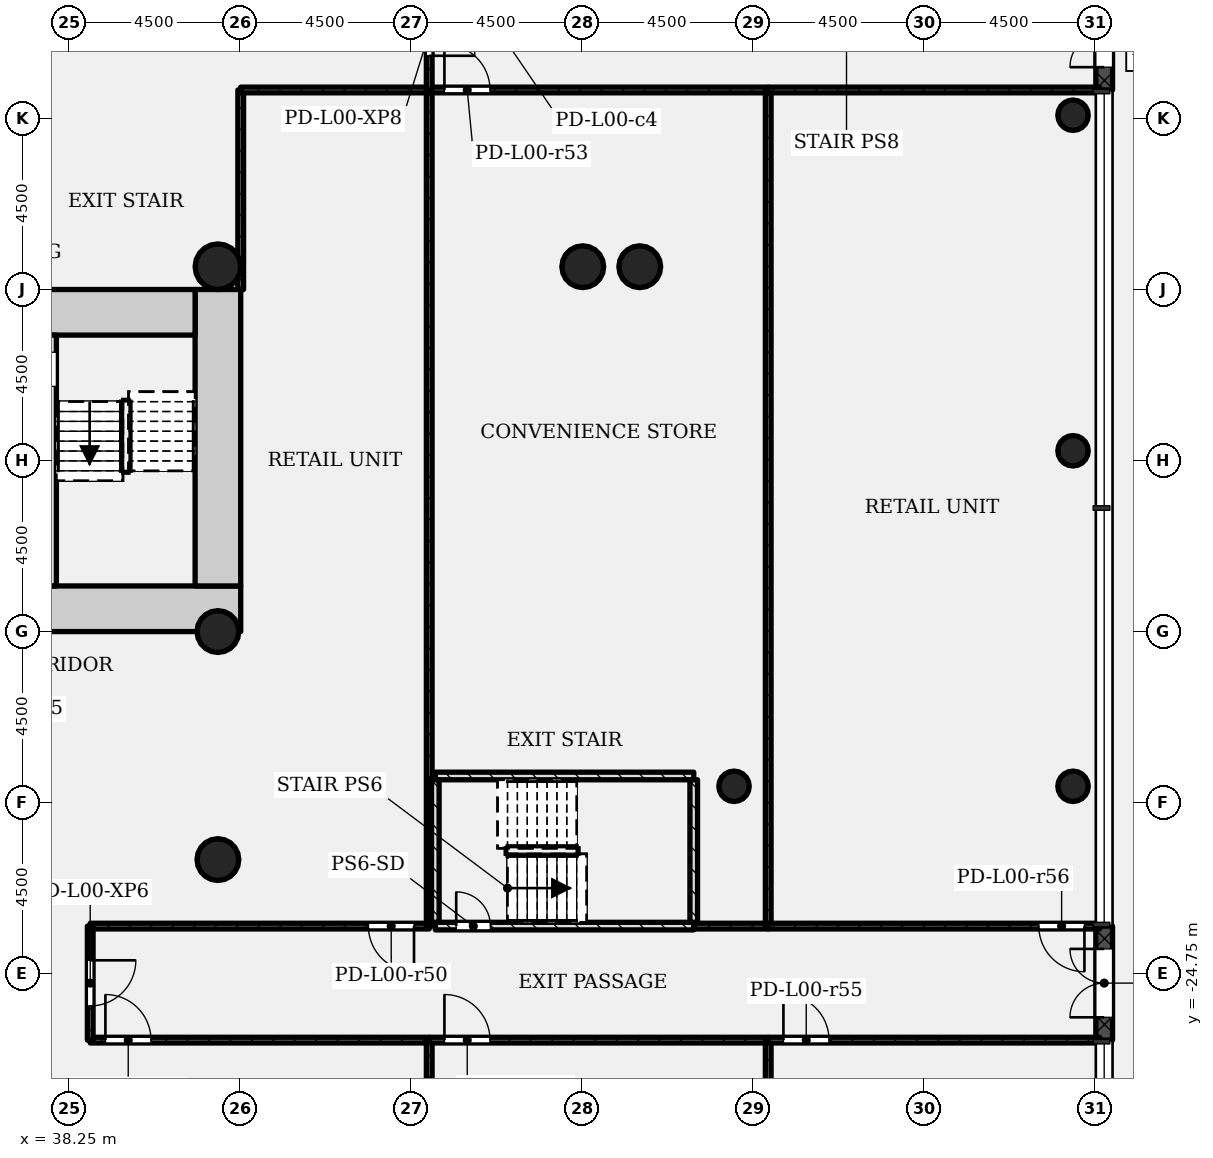
"""IFC4 building model, lengths in metres.
Left out: names, types, materials, properties, quantities, classifications, styles, units other than length and angle.
Written with IfcOpenShell. Run it as: python <this file> out.ifc"""

import sys

from ifc_helpers import new_model, si_unit, direction, frame, frame_2d, origin, origin_2d, place, context, subcontext, project, spatial, rectangle, hollow_circle, extrude, element, fill, save


model = new_model("IFC4")
c1 = context("Model", 3, precision=1e-05, world=origin(), true_north=direction((0.0, 1.0)))
c2 = subcontext(c1, "Body", "Model", "MODEL_VIEW")
j1 = project(units=[si_unit("LENGTHUNIT", "METRE"), si_unit("PLANEANGLEUNIT", "RADIAN")], contexts=[c1])
p1 = place(None, origin())
s1 = spatial("IfcSite", under=j1, at=p1, CompositionType="ELEMENT")
p2 = place(p1, origin())
s2 = spatial("IfcBuilding", under=s1, at=p2, CompositionType="ELEMENT")
p3 = place(p2, origin())
s3 = spatial("IfcBuildingStorey", under=s2, at=p3, CompositionType="ELEMENT", Elevation=0.0)
p4 = place(p3, frame((30.45, -15.15, -0.4), z_axis=(0.0, 0.0, 1.0), x_axis=(1.0, 0.0, 0.0)))
e1 = element("IfcWall", 1, at=p4, inside=s3, PredefinedType="SHEAR", context=c2, shape_type="SweptSolid", body=[
    extrude(rectangle(XDim=12.3, YDim=1.2, at=frame_2d((6.15, 0.0))), origin(), (0.0, 0.0, 1.0), 6.4),
])
p5 = place(p4, frame((4.65, 0.0, 0.4)))
e2 = element("IfcOpeningElement", 2, at=p5, cuts=e1, PredefinedType="OPENING", context=c2, shape_type="SweptSolid", body=[
    extrude(rectangle(XDim=1.8, YDim=2.1, at=frame_2d((0.9, 1.05))), frame((0.0, 0.61, 0.0), z_axis=(0.0, -1.0, 0.0), x_axis=(1.0, 0.0, 0.0)), (0.0, 0.0, 1.0), 1.22),
])
p6 = place(p3, frame((42.15, -14.55, -0.4), z_axis=(0.0, 0.0, 1.0), x_axis=(0.0, 1.0, 0.0)))
e3 = element("IfcWall", 3, at=p6, inside=s3, PredefinedType="SHEAR", context=c2, shape_type="SweptSolid", body=[
    extrude(rectangle(XDim=7.8, YDim=1.2, at=frame_2d((3.9, 0.0))), origin(), (0.0, 0.0, 1.0), 6.4),
])
p7 = place(p3, frame((41.55, -7.35, -0.4), z_axis=(0.0, 0.0, 1.0), x_axis=(-1.0, 0.0, 0.0)))
e4 = element("IfcWall", 4, at=p7, inside=s3, PredefinedType="SHEAR", context=c2, shape_type="SweptSolid", body=[
    extrude(rectangle(XDim=12.3, YDim=1.2, at=frame_2d((6.15, 0.0))), origin(), (0.0, 0.0, 1.0), 6.4),
])
p8 = place(p7, frame((4.65, 0.0, 0.4)))
e5 = element("IfcOpeningElement", 5, at=p8, cuts=e4, PredefinedType="OPENING", context=c2, shape_type="SweptSolid", body=[
    extrude(rectangle(XDim=1.8, YDim=2.1, at=frame_2d((0.9, 1.05))), frame((0.0, 0.61, 0.0), z_axis=(0.0, -1.0, 0.0), x_axis=(1.0, 0.0, 0.0)), (0.0, 0.0, 1.0), 1.22),
])
p9 = place(p3, frame((37.7, -14.55, -0.4), z_axis=(0.0, 0.0, 1.0), x_axis=(0.0, 1.0, 0.0)))
e6 = element("IfcWall", 6, at=p9, inside=s3, PredefinedType="SHEAR", context=c2, shape_type="SweptSolid", body=[
    extrude(rectangle(XDim=6.6, YDim=0.4, at=frame_2d((3.3, 0.0))), origin(), (0.0, 0.0, 1.0), 6.4),
])
p10 = place(p9, frame((5.25, 0.0, 0.4)))
e7 = element("IfcOpeningElement", 7, at=p10, cuts=e6, PredefinedType="OPENING", context=c2, shape_type="SweptSolid", body=[
    extrude(rectangle(XDim=0.9, YDim=2.1, at=frame_2d((0.45, 1.05))), frame((0.0, 0.21, 0.0), z_axis=(0.0, -1.0, 0.0), x_axis=(1.0, 0.0, 0.0)), (0.0, 0.0, 1.0), 0.42),
])
for number, where, z_axis, x_axis in (
    (8, (42.15, -15.75, -0.4), (0.0, 0.0, 1.0), (1.0, 0.0, 0.0)),
    (9, (42.15, -21.75, -0.4), (0.0, 0.0, 1.0), (1.0, 0.0, 0.0)),
    (10, (51.75, -6.15, -0.4), (0.0, 0.0, 1.0), (1.0, 0.0, 0.0)),
    (11, (53.25, -6.15, -0.4), (0.0, 0.0, 1.0), (1.0, 0.0, 0.0)),
):
    element("IfcColumn", number, at=place(p3, frame(where, z_axis=z_axis, x_axis=x_axis)), inside=s3, PredefinedType="COLUMN", context=c2, shape_type="SweptSolid", body=[
        extrude(hollow_circle(Radius=0.55, WallThickness=0.04, at=origin_2d()), origin(), (0.0, 0.0, 1.0), 6.4),
    ])
p11 = place(p3, frame((42.15, -6.15, -0.4), z_axis=(0.0, 0.0, 1.0), x_axis=(1.0, 0.0, 0.0)))
e12 = element("IfcColumn", 12, at=p11, inside=s3, PredefinedType="COLUMN", context=c2, shape_type="SweptSolid", body=[
    extrude(hollow_circle(Radius=0.6, WallThickness=0.045, at=origin_2d()), origin(), (0.0, 0.0, 1.0), 6.4),
])
for number, where, z_axis, x_axis in (
    (13, (55.73, -19.821, -0.4), (0.0, 0.0, 1.0), (1.0, 0.0, 0.0)),
    (14, (64.65, -19.821, -0.4), (0.0, 0.0, 1.0), (1.0, 0.0, 0.0)),
    (15, (64.65, -10.993, -0.4), (0.0, 0.0, 1.0), (1.0, 0.0, 0.0)),
    (16, (64.65, -2.164, -0.4), (0.0, 0.0, 1.0), (1.0, 0.0, 0.0)),
):
    element("IfcColumn", number, at=place(p3, frame(where, z_axis=z_axis, x_axis=x_axis)), inside=s3, PredefinedType="COLUMN", context=c2, shape_type="SweptSolid", body=[
        extrude(hollow_circle(Radius=0.4, WallThickness=0.028, at=origin_2d()), origin(), (0.0, 0.0, 1.0), 6.4),
    ])
p12 = place(p3, frame((65.47, -26.5, 0.0), z_axis=(0.0, 0.0, 1.0), x_axis=(0.0, 1.0, 0.0)))
e17 = element("IfcWall", 17, at=p12, inside=s3, PredefinedType="STANDARD", context=c2, shape_type="SweptSolid", body=[
    extrude(rectangle(XDim=3.0, YDim=0.44, at=frame_2d((1.5, 0.0))), origin(), (0.0, 0.0, 1.0), 5.7),
])
p13 = place(p12, frame((0.6, 0.0, 0.0)))
e18 = element("IfcOpeningElement", 18, at=p13, cuts=e17, PredefinedType="OPENING", context=c2, shape_type="SweptSolid", body=[
    extrude(rectangle(XDim=1.8, YDim=2.1, at=frame_2d((0.9, 1.05))), frame((0.0, 0.23, 0.0), z_axis=(0.0, -1.0, 0.0), x_axis=(1.0, 0.0, 0.0)), (0.0, 0.0, 1.0), 0.46),
])
p14 = place(p3, frame((65.47, -1.5, 0.0), z_axis=(0.0, 0.0, 1.0), x_axis=(0.0, 1.0, 0.0)))
e19 = element("IfcWall", 19, at=p14, inside=s3, PredefinedType="STANDARD", context=c2, shape_type="SweptSolid", body=[
    extrude(rectangle(XDim=3.0, YDim=0.44, at=frame_2d((1.5, 0.0))), origin(), (0.0, 0.0, 1.0), 5.7),
])
p15 = place(p14, frame((0.6, 0.0, 0.0)))
e20 = element("IfcOpeningElement", 20, at=p15, cuts=e19, PredefinedType="OPENING", context=c2, shape_type="SweptSolid", body=[
    extrude(rectangle(XDim=1.8, YDim=2.1, at=frame_2d((0.9, 1.05))), frame((0.0, 0.23, 0.0), z_axis=(0.0, -1.0, 0.0), x_axis=(1.0, 0.0, 0.0)), (0.0, 0.0, 1.0), 0.46),
])
p16 = place(p3, frame((38.79, -26.5, 0.0), z_axis=(0.0, 0.0, 1.0), x_axis=(1.0, 0.0, 0.0)))
e21 = element("IfcWall", 21, at=p16, inside=s3, PredefinedType="PARTITIONING", context=c2, shape_type="SweptSolid", body=[
    extrude(rectangle(XDim=8.92, YDim=0.15, at=frame_2d((4.46, 0.0))), origin(), (0.0, 0.0, 1.0), 5.58),
])
p17 = place(p16, frame((0.4, 0.0, 0.0)))
e22 = element("IfcOpeningElement", 22, at=p17, cuts=e21, PredefinedType="OPENING", context=c2, shape_type="SweptSolid", body=[
    extrude(rectangle(XDim=1.2, YDim=2.1, at=frame_2d((0.6, 1.05))), frame((0.0, 0.085, 0.0), z_axis=(0.0, -1.0, 0.0), x_axis=(1.0, 0.0, 0.0)), (0.0, 0.0, 1.0), 0.17),
])
p18 = place(p3, frame((47.71, -26.5, 0.0), z_axis=(0.0, 0.0, 1.0), x_axis=(0.0, -1.0, 0.0)))
e23 = element("IfcWall", 23, at=p18, inside=s3, PredefinedType="PARTITIONING", context=c2, shape_type="SweptSolid", body=[
    extrude(rectangle(XDim=16.35, YDim=0.15, at=frame_2d((8.175, 0.0))), origin(), (0.0, 0.0, 1.0), 5.58),
])
p19 = place(p3, frame((42.75, -6.75, 0.0), z_axis=(0.0, 0.0, 1.0), x_axis=(0.0, 1.0, 0.0)))
e24 = element("IfcWall", 24, at=p19, inside=s3, PredefinedType="PARTITIONING", context=c2, shape_type="SweptSolid", body=[
    extrude(rectangle(XDim=5.25, YDim=0.15, at=frame_2d((2.625, 0.0))), origin(), (0.0, 0.0, 1.0), 5.58),
])
p20 = place(p3, frame((42.75, -1.5, 0.0), z_axis=(0.0, 0.0, 1.0), x_axis=(1.0, 0.0, 0.0)))
e25 = element("IfcWall", 25, at=p20, inside=s3, PredefinedType="PARTITIONING", context=c2, shape_type="SweptSolid", body=[
    extrude(rectangle(XDim=4.96, YDim=0.15, at=frame_2d((2.48, 0.0))), origin(), (0.0, 0.0, 1.0), 5.58),
])
p21 = place(p3, frame((47.71, -23.5, 0.0), z_axis=(0.0, 0.0, 1.0), x_axis=(-1.0, 0.0, 0.0)))
e26 = element("IfcWall", 26, at=p21, inside=s3, PredefinedType="PARTITIONING", context=c2, shape_type="SweptSolid", body=[
    extrude(rectangle(XDim=8.92, YDim=0.15, at=frame_2d((4.46, 0.0))), origin(), (0.0, 0.0, 1.0), 5.58),
])
p22 = place(p21, frame((0.4, 0.0, 0.0)))
e27 = element("IfcOpeningElement", 27, at=p22, cuts=e26, PredefinedType="OPENING", context=c2, shape_type="SweptSolid", body=[
    extrude(rectangle(XDim=1.2, YDim=2.1, at=frame_2d((0.6, 1.05))), frame((0.0, 0.085, 0.0), z_axis=(0.0, -1.0, 0.0), x_axis=(1.0, 0.0, 0.0)), (0.0, 0.0, 1.0), 0.17),
])
p23 = place(p3, frame((47.71, -1.5, 0.0), z_axis=(0.0, 0.0, 1.0), x_axis=(0.0, -1.0, 0.0)))
e28 = element("IfcWall", 28, at=p23, inside=s3, PredefinedType="PARTITIONING", context=c2, shape_type="SweptSolid", body=[
    extrude(rectangle(XDim=22.0, YDim=0.15, at=frame_2d((11.0, 0.0))), origin(), (0.0, 0.0, 1.0), 5.58),
])
p24 = place(p3, frame((47.71, -26.5, 0.0), z_axis=(0.0, 0.0, 1.0), x_axis=(1.0, 0.0, 0.0)))
e29 = element("IfcWall", 29, at=p24, inside=s3, PredefinedType="PARTITIONING", context=c2, shape_type="SweptSolid", body=[
    extrude(rectangle(XDim=8.92, YDim=0.15, at=frame_2d((4.46, 0.0))), origin(), (0.0, 0.0, 1.0), 5.58),
])
p25 = place(p24, frame((0.4, 0.0, 0.0)))
e30 = element("IfcOpeningElement", 30, at=p25, cuts=e29, PredefinedType="OPENING", context=c2, shape_type="SweptSolid", body=[
    extrude(rectangle(XDim=1.2, YDim=2.1, at=frame_2d((0.6, 1.05))), frame((0.0, 0.085, 0.0), z_axis=(0.0, -1.0, 0.0), x_axis=(1.0, 0.0, 0.0)), (0.0, 0.0, 1.0), 0.17),
])
p26 = place(p3, frame((56.63, -26.5, 0.0), z_axis=(0.0, 0.0, 1.0), x_axis=(0.0, -1.0, 0.0)))
e31 = element("IfcWall", 31, at=p26, inside=s3, PredefinedType="PARTITIONING", context=c2, shape_type="SweptSolid", body=[
    extrude(rectangle(XDim=16.35, YDim=0.15, at=frame_2d((8.175, 0.0))), origin(), (0.0, 0.0, 1.0), 5.58),
])
p27 = place(p3, frame((56.63, -23.5, 0.0), z_axis=(0.0, 0.0, 1.0), x_axis=(-1.0, 0.0, 0.0)))
e32 = element("IfcWall", 32, at=p27, inside=s3, PredefinedType="PARTITIONING", context=c2, shape_type="SweptSolid", body=[
    extrude(rectangle(XDim=1.96, YDim=0.15, at=frame_2d((0.98, 0.0))), origin(), (0.0, 0.0, 1.0), 5.58),
])
p28 = place(p3, frame((47.71, -1.5, 0.0), z_axis=(0.0, 0.0, 1.0), x_axis=(1.0, 0.0, 0.0)))
e33 = element("IfcWall", 33, at=p28, inside=s3, PredefinedType="PARTITIONING", context=c2, shape_type="SweptSolid", body=[
    extrude(rectangle(XDim=8.92, YDim=0.15, at=frame_2d((4.46, 0.0))), origin(), (0.0, 0.0, 1.0), 5.58),
])
p29 = place(p28, frame((0.4, 0.0, 0.0)))
e34 = element("IfcOpeningElement", 34, at=p29, cuts=e33, PredefinedType="OPENING", context=c2, shape_type="SweptSolid", body=[
    extrude(rectangle(XDim=1.2, YDim=2.1, at=frame_2d((0.6, 1.05))), frame((0.0, 0.085, 0.0), z_axis=(0.0, -1.0, 0.0), x_axis=(1.0, 0.0, 0.0)), (0.0, 0.0, 1.0), 0.17),
])
p30 = place(p3, frame((56.63, -1.5, 0.0), z_axis=(0.0, 0.0, 1.0), x_axis=(0.0, -1.0, 0.0)))
e35 = element("IfcWall", 35, at=p30, inside=s3, PredefinedType="PARTITIONING", context=c2, shape_type="SweptSolid", body=[
    extrude(rectangle(XDim=22.0, YDim=0.15, at=frame_2d((11.0, 0.0))), origin(), (0.0, 0.0, 1.0), 5.58),
])
p31 = place(p3, frame((56.63, -26.5, 0.0), z_axis=(0.0, 0.0, 1.0), x_axis=(1.0, 0.0, 0.0)))
e36 = element("IfcWall", 36, at=p31, inside=s3, PredefinedType="PARTITIONING", context=c2, shape_type="SweptSolid", body=[
    extrude(rectangle(XDim=8.72, YDim=0.15, at=frame_2d((4.36, 0.0))), origin(), (0.0, 0.0, 1.0), 5.58),
])
p32 = place(p31, frame((0.4, 0.0, 0.0)))
e37 = element("IfcOpeningElement", 37, at=p32, cuts=e36, PredefinedType="OPENING", context=c2, shape_type="SweptSolid", body=[
    extrude(rectangle(XDim=1.2, YDim=2.1, at=frame_2d((0.6, 1.05))), frame((0.0, 0.085, 0.0), z_axis=(0.0, -1.0, 0.0), x_axis=(1.0, 0.0, 0.0)), (0.0, 0.0, 1.0), 0.17),
])
p33 = place(p3, frame((65.35, -23.5, 0.0), z_axis=(0.0, 0.0, 1.0), x_axis=(-1.0, 0.0, 0.0)))
e38 = element("IfcWall", 38, at=p33, inside=s3, PredefinedType="PARTITIONING", context=c2, shape_type="SweptSolid", body=[
    extrude(rectangle(XDim=8.72, YDim=0.15, at=frame_2d((4.36, 0.0))), origin(), (0.0, 0.0, 1.0), 5.58),
])
p34 = place(p33, frame((0.4, 0.0, 0.0)))
e39 = element("IfcOpeningElement", 39, at=p34, cuts=e38, PredefinedType="OPENING", context=c2, shape_type="SweptSolid", body=[
    extrude(rectangle(XDim=1.2, YDim=2.1, at=frame_2d((0.6, 1.05))), frame((0.0, 0.085, 0.0), z_axis=(0.0, -1.0, 0.0), x_axis=(1.0, 0.0, 0.0)), (0.0, 0.0, 1.0), 0.17),
])
p35 = place(p3, frame((56.63, -1.5, 0.0), z_axis=(0.0, 0.0, 1.0), x_axis=(1.0, 0.0, 0.0)))
e40 = element("IfcWall", 40, at=p35, inside=s3, PredefinedType="PARTITIONING", context=c2, shape_type="SweptSolid", body=[
    extrude(rectangle(XDim=8.72, YDim=0.15, at=frame_2d((4.36, 0.0))), origin(), (0.0, 0.0, 1.0), 5.58),
])
p36 = place(p3, frame((38.79, -26.5, 0.0), z_axis=(0.0, 0.0, 1.0), x_axis=(0.0, 1.0, 0.0)))
e41 = element("IfcWall", 41, at=p36, inside=s3, PredefinedType="PARTITIONING", context=c2, shape_type="SweptSolid", body=[
    extrude(rectangle(XDim=3.0, YDim=0.15, at=frame_2d((1.5, 0.0))), origin(), (0.0, 0.0, 1.0), 5.58),
])
p37 = place(p36, frame((0.9, 0.0, 0.0)))
e42 = element("IfcOpeningElement", 42, at=p37, cuts=e41, PredefinedType="OPENING", context=c2, shape_type="SweptSolid", body=[
    extrude(rectangle(XDim=1.2, YDim=2.1, at=frame_2d((0.6, 1.05))), frame((0.0, 0.085, 0.0), z_axis=(0.0, -1.0, 0.0), x_axis=(1.0, 0.0, 0.0)), (0.0, 0.0, 1.0), 0.17),
])
p38 = place(p3, frame((47.71, -1.5, 0.0), z_axis=(0.0, 0.0, 1.0), x_axis=(0.0, 1.0, 0.0)))
e43 = element("IfcWall", 43, at=p38, inside=s3, PredefinedType="PARTITIONING", context=c2, shape_type="SweptSolid", body=[
    extrude(rectangle(XDim=3.0, YDim=0.15, at=frame_2d((1.5, 0.0))), origin(), (0.0, 0.0, 1.0), 5.58),
])
p39 = place(p38, frame((0.9, 0.0, 0.0)))
e44 = element("IfcOpeningElement", 44, at=p39, cuts=e43, PredefinedType="OPENING", context=c2, shape_type="SweptSolid", body=[
    extrude(rectangle(XDim=1.2, YDim=2.1, at=frame_2d((0.6, 1.05))), frame((0.0, 0.085, 0.0), z_axis=(0.0, -1.0, 0.0), x_axis=(1.0, 0.0, 0.0)), (0.0, 0.0, 1.0), 0.17),
])
p40 = place(p3, frame((47.87, -23.5, 0.0), z_axis=(0.0, 0.0, 1.0), x_axis=(1.0, 0.0, 0.0)))
e45 = element("IfcWall", 45, at=p40, inside=s3, PredefinedType="SHEAR", context=c2, shape_type="SweptSolid", body=[
    extrude(rectangle(XDim=6.8, YDim=0.2, at=frame_2d((3.4, 0.0))), origin(), (0.0, 0.0, 1.0), 5.58),
])
p41 = place(p40, frame((0.55, 0.0, 0.0)))
e46 = element("IfcOpeningElement", 46, at=p41, cuts=e45, PredefinedType="OPENING", context=c2, shape_type="SweptSolid", body=[
    extrude(rectangle(XDim=0.9, YDim=2.1, at=frame_2d((0.45, 1.05))), frame((0.0, 0.11, 0.0), z_axis=(0.0, -1.0, 0.0), x_axis=(1.0, 0.0, 0.0)), (0.0, 0.0, 1.0), 0.22),
])
p42 = place(p3, frame((47.87, -19.55, 0.0), z_axis=(0.0, 0.0, 1.0), x_axis=(1.0, 0.0, 0.0)))
e47 = element("IfcWall", 47, at=p42, inside=s3, PredefinedType="SHEAR", context=c2, shape_type="SweptSolid", body=[
    extrude(rectangle(XDim=6.8, YDim=0.2, at=frame_2d((3.4, 0.0))), origin(), (0.0, 0.0, 1.0), 5.58),
])
for number, where, z_axis, x_axis in (
    (48, (47.87, -23.4, 0.0), (0.0, 0.0, 1.0), (0.0, 1.0, 0.0)),
    (49, (54.67, -23.4, 0.0), (0.0, 0.0, 1.0), (0.0, 1.0, 0.0)),
):
    element("IfcWall", number, at=place(p3, frame(where, z_axis=z_axis, x_axis=x_axis)), inside=s3, PredefinedType="SHEAR", context=c2, shape_type="SweptSolid", body=[
        extrude(rectangle(XDim=3.75, YDim=0.2, at=frame_2d((1.875, 0.0))), origin(), (0.0, 0.0, 1.0), 5.58),
    ])
p43 = place(p13, origin())
e50 = element("IfcDoor", 50, at=p43, inside=s3, OperationType="DOUBLE_DOOR_DOUBLE_SWING", PredefinedType="DOOR", context=c2, shape_type="SweptSolid", body=[
    extrude(rectangle(XDim=1.8, YDim=2.1, at=frame_2d((0.9, 1.05))), frame((0.0, 0.025, 0.0), z_axis=(0.0, -1.0, 0.0), x_axis=(1.0, 0.0, 0.0)), (0.0, 0.0, 1.0), 0.05),
])
fill(e18, e50)
p44 = place(p15, origin())
e51 = element("IfcDoor", 51, at=p44, inside=s3, OperationType="DOUBLE_DOOR_DOUBLE_SWING", PredefinedType="DOOR", context=c2, shape_type="SweptSolid", body=[
    extrude(rectangle(XDim=1.8, YDim=2.1, at=frame_2d((0.9, 1.05))), frame((0.0, 0.025, 0.0), z_axis=(0.0, -1.0, 0.0), x_axis=(1.0, 0.0, 0.0)), (0.0, 0.0, 1.0), 0.05),
])
fill(e20, e51)
p45 = place(p17, origin())
e52 = element("IfcDoor", 52, at=p45, inside=s3, OperationType="SINGLE_SWING_RIGHT", PredefinedType="DOOR", context=c2, shape_type="SweptSolid", body=[
    extrude(rectangle(XDim=1.2, YDim=2.1, at=frame_2d((0.6, 1.05))), frame((0.0, 0.025, 0.0), z_axis=(0.0, -1.0, 0.0), x_axis=(1.0, 0.0, 0.0)), (0.0, 0.0, 1.0), 0.05),
])
fill(e22, e52)
p46 = place(p22, origin())
e53 = element("IfcDoor", 53, at=p46, inside=s3, OperationType="SINGLE_SWING_RIGHT", PredefinedType="DOOR", context=c2, shape_type="SweptSolid", body=[
    extrude(rectangle(XDim=1.2, YDim=2.1, at=frame_2d((0.6, 1.05))), frame((0.0, 0.025, 0.0), z_axis=(0.0, -1.0, 0.0), x_axis=(1.0, 0.0, 0.0)), (0.0, 0.0, 1.0), 0.05),
])
fill(e27, e53)
p47 = place(p25, origin())
e54 = element("IfcDoor", 54, at=p47, inside=s3, OperationType="SINGLE_SWING_RIGHT", PredefinedType="DOOR", context=c2, shape_type="SweptSolid", body=[
    extrude(rectangle(XDim=1.2, YDim=2.1, at=frame_2d((0.6, 1.05))), frame((0.0, 0.025, 0.0), z_axis=(0.0, -1.0, 0.0), x_axis=(1.0, 0.0, 0.0)), (0.0, 0.0, 1.0), 0.05),
])
fill(e30, e54)
p48 = place(p29, origin())
e55 = element("IfcDoor", 55, at=p48, inside=s3, OperationType="SINGLE_SWING_RIGHT", PredefinedType="DOOR", context=c2, shape_type="SweptSolid", body=[
    extrude(rectangle(XDim=1.2, YDim=2.1, at=frame_2d((0.6, 1.05))), frame((0.0, 0.025, 0.0), z_axis=(0.0, -1.0, 0.0), x_axis=(1.0, 0.0, 0.0)), (0.0, 0.0, 1.0), 0.05),
])
fill(e34, e55)
p49 = place(p32, origin())
e56 = element("IfcDoor", 56, at=p49, inside=s3, OperationType="SINGLE_SWING_RIGHT", PredefinedType="DOOR", context=c2, shape_type="SweptSolid", body=[
    extrude(rectangle(XDim=1.2, YDim=2.1, at=frame_2d((0.6, 1.05))), frame((0.0, 0.025, 0.0), z_axis=(0.0, -1.0, 0.0), x_axis=(1.0, 0.0, 0.0)), (0.0, 0.0, 1.0), 0.05),
])
fill(e37, e56)
p50 = place(p34, origin())
e57 = element("IfcDoor", 57, at=p50, inside=s3, OperationType="SINGLE_SWING_RIGHT", PredefinedType="DOOR", context=c2, shape_type="SweptSolid", body=[
    extrude(rectangle(XDim=1.2, YDim=2.1, at=frame_2d((0.6, 1.05))), frame((0.0, 0.025, 0.0), z_axis=(0.0, -1.0, 0.0), x_axis=(1.0, 0.0, 0.0)), (0.0, 0.0, 1.0), 0.05),
])
fill(e39, e57)
p51 = place(p37, origin())
e58 = element("IfcDoor", 58, at=p51, inside=s3, OperationType="SINGLE_SWING_RIGHT", PredefinedType="DOOR", context=c2, shape_type="SweptSolid", body=[
    extrude(rectangle(XDim=1.2, YDim=2.1, at=frame_2d((0.6, 1.05))), frame((0.0, 0.025, 0.0), z_axis=(0.0, -1.0, 0.0), x_axis=(1.0, 0.0, 0.0)), (0.0, 0.0, 1.0), 0.05),
])
fill(e42, e58)
p52 = place(p39, origin())
e59 = element("IfcDoor", 59, at=p52, inside=s3, OperationType="SINGLE_SWING_LEFT", PredefinedType="DOOR", context=c2, shape_type="SweptSolid", body=[
    extrude(rectangle(XDim=1.2, YDim=2.1, at=frame_2d((0.6, 1.05))), frame((0.0, 0.025, 0.0), z_axis=(0.0, -1.0, 0.0), x_axis=(1.0, 0.0, 0.0)), (0.0, 0.0, 1.0), 0.05),
])
fill(e44, e59)
p53 = place(p41, origin())
e60 = element("IfcDoor", 60, at=p53, inside=s3, OperationType="SINGLE_SWING_RIGHT", PredefinedType="DOOR", context=c2, shape_type="SweptSolid", body=[
    extrude(rectangle(XDim=0.9, YDim=2.1, at=frame_2d((0.45, 1.05))), frame((0.0, 0.025, 0.0), z_axis=(0.0, -1.0, 0.0), x_axis=(1.0, 0.0, 0.0)), (0.0, 0.0, 1.0), 0.05),
])
fill(e46, e60)
save(model, sys.argv[1])
